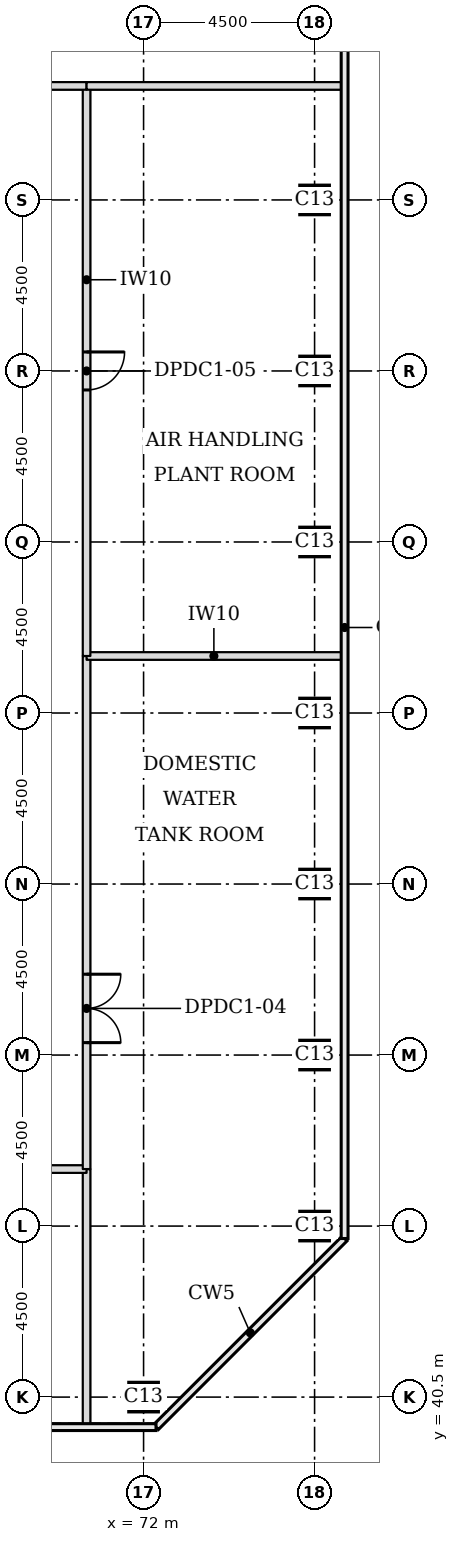
"""IFC4 building model, lengths in metres.
Left out: names, types, materials, properties, quantities, classifications, styles, units other than length and angle.
Written with IfcOpenShell. Run it as: python <this file> out.ifc"""

import sys

from ifc_helpers import new_model, si_unit, direction, frame, frame_2d, origin, origin_2d, place, context, subcontext, project, spatial, rectangle, extrude, element, fill, save


model = new_model("IFC4")
c1 = context("Model", 3, precision=1e-05, world=origin(), true_north=direction((0.0, 1.0)))
c2 = subcontext(c1, "Body", "Model", "MODEL_VIEW")
j1 = project(units=[si_unit("LENGTHUNIT", "METRE"), si_unit("PLANEANGLEUNIT", "RADIAN")], contexts=[c1])
p1 = place(None, origin())
s1 = spatial("IfcSite", under=j1, at=p1, CompositionType="ELEMENT")
p2 = place(p1, origin())
s2 = spatial("IfcBuilding", under=s1, at=p2, CompositionType="ELEMENT")
p3 = place(p2, frame((0.0, 0.0, 263.7)))
s3 = spatial("IfcBuildingStorey", under=s2, at=p3, CompositionType="ELEMENT", Elevation=263.7)
for number, where, z_axis, x_axis in (
    (1, (72.0, 40.5, 0.0), (0.0, 0.0, 1.0), (1.0, 0.0, 0.0)),
    (2, (76.5, 45.0, 0.0), (0.0, 0.0, 1.0), (1.0, 0.0, 0.0)),
    (3, (76.5, 49.5, 0.0), (0.0, 0.0, 1.0), (1.0, 0.0, 0.0)),
    (4, (76.5, 54.0, 0.0), (0.0, 0.0, 1.0), (1.0, 0.0, 0.0)),
    (5, (76.5, 58.5, 0.0), (0.0, 0.0, 1.0), (1.0, 0.0, 0.0)),
    (6, (76.5, 63.0, 0.0), (0.0, 0.0, 1.0), (1.0, 0.0, 0.0)),
    (7, (76.5, 67.5, 0.0), (0.0, 0.0, 1.0), (1.0, 0.0, 0.0)),
    (8, (76.5, 72.0, 0.0), (0.0, 0.0, 1.0), (1.0, 0.0, 0.0)),
):
    element("IfcColumn", number, at=place(p3, frame(where, z_axis=z_axis, x_axis=x_axis)), inside=s3, PredefinedType="COLUMN", context=c2, shape_type="SweptSolid", body=[
        extrude(rectangle(XDim=0.7, YDim=0.7, at=origin_2d()), origin(), (0.0, 0.0, 1.0), 5.0),
    ])
p4 = place(p3, frame((70.5, 39.8, 0.0), z_axis=(0.0, 0.0, 1.0), x_axis=(0.0, 1.0, 0.0)))
e9 = element("IfcWall", 9, at=p4, inside=s3, PredefinedType="PARTITIONING", context=c2, shape_type="SweptSolid", body=[
    extrude(rectangle(XDim=6.7, YDim=0.2, at=frame_2d((3.35, 0.0))), origin(), (0.0, 0.0, 1.0), 4.75),
])
p5 = place(p3, frame((56.0, 46.5, 0.0), z_axis=(0.0, 0.0, 1.0), x_axis=(1.0, 0.0, 0.0)))
e10 = element("IfcWall", 10, at=p5, inside=s3, PredefinedType="PARTITIONING", context=c2, shape_type="SweptSolid", body=[
    extrude(rectangle(XDim=14.5, YDim=0.2, at=frame_2d((7.25, 0.0))), origin(), (0.0, 0.0, 1.0), 4.75),
])
p6 = place(p5, frame((6.75, 0.0, 0.0)))
e11 = element("IfcOpeningElement", 11, at=p6, cuts=e10, PredefinedType="OPENING", context=c2, shape_type="SweptSolid", body=[
    extrude(rectangle(XDim=1.0, YDim=2.1, at=frame_2d((0.5, 1.05))), frame((0.0, 0.11, 0.0), z_axis=(0.0, -1.0, 0.0), x_axis=(1.0, 0.0, 0.0)), (0.0, 0.0, 1.0), 0.22),
])
p7 = place(p3, frame((70.5, 46.5, 0.0), z_axis=(0.0, 0.0, 1.0), x_axis=(0.0, 1.0, 0.0)))
e12 = element("IfcWall", 12, at=p7, inside=s3, PredefinedType="PARTITIONING", context=c2, shape_type="SweptSolid", body=[
    extrude(rectangle(XDim=13.5, YDim=0.2, at=frame_2d((6.75, 0.0))), origin(), (0.0, 0.0, 1.0), 4.75),
])
p8 = place(p7, frame((3.327, 0.0, 0.0)))
e13 = element("IfcOpeningElement", 13, at=p8, cuts=e12, PredefinedType="OPENING", context=c2, shape_type="SweptSolid", body=[
    extrude(rectangle(XDim=1.8, YDim=2.1, at=frame_2d((0.9, 1.05))), frame((0.0, 0.11, 0.0), z_axis=(0.0, -1.0, 0.0), x_axis=(1.0, 0.0, 0.0)), (0.0, 0.0, 1.0), 0.22),
])
p9 = place(p3, frame((70.5, 60.0, 0.0), z_axis=(0.0, 0.0, 1.0), x_axis=(1.0, 0.0, 0.0)))
e14 = element("IfcWall", 14, at=p9, inside=s3, PredefinedType="PARTITIONING", context=c2, shape_type="SweptSolid", body=[
    extrude(rectangle(XDim=6.7, YDim=0.2, at=frame_2d((3.35, 0.0))), origin(), (0.0, 0.0, 1.0), 4.75),
])
p10 = place(p3, frame((70.5, 60.0, 0.0), z_axis=(0.0, 0.0, 1.0), x_axis=(0.0, 1.0, 0.0)))
e15 = element("IfcWall", 15, at=p10, inside=s3, PredefinedType="PARTITIONING", context=c2, shape_type="SweptSolid", body=[
    extrude(rectangle(XDim=15.0, YDim=0.2, at=frame_2d((7.5, 0.0))), origin(), (0.0, 0.0, 1.0), 4.75),
])
p11 = place(p10, frame((7.0, 0.0, 0.0)))
e16 = element("IfcOpeningElement", 16, at=p11, cuts=e15, PredefinedType="OPENING", context=c2, shape_type="SweptSolid", body=[
    extrude(rectangle(XDim=1.0, YDim=2.1, at=frame_2d((0.5, 1.05))), frame((0.0, 0.11, 0.0), z_axis=(0.0, -1.0, 0.0), x_axis=(1.0, 0.0, 0.0)), (0.0, 0.0, 1.0), 0.22),
])
p12 = place(p3, frame((56.0, 75.0, 0.0), z_axis=(0.0, 0.0, 1.0), x_axis=(1.0, 0.0, 0.0)))
e17 = element("IfcWall", 17, at=p12, inside=s3, PredefinedType="PARTITIONING", context=c2, shape_type="SweptSolid", body=[
    extrude(rectangle(XDim=14.5, YDim=0.2, at=frame_2d((7.25, 0.0))), origin(), (0.0, 0.0, 1.0), 4.75),
])
p13 = place(p12, frame((8.869, 0.0, 0.0)))
e18 = element("IfcOpeningElement", 18, at=p13, cuts=e17, PredefinedType="OPENING", context=c2, shape_type="SweptSolid", body=[
    extrude(rectangle(XDim=1.8, YDim=2.1, at=frame_2d((0.9, 1.05))), frame((0.0, 0.11, 0.0), z_axis=(0.0, -1.0, 0.0), x_axis=(1.0, 0.0, 0.0)), (0.0, 0.0, 1.0), 0.22),
])
p14 = place(p3, frame((70.5, 75.0, 0.0), z_axis=(0.0, 0.0, 1.0), x_axis=(1.0, 0.0, 0.0)))
e19 = element("IfcWall", 19, at=p14, inside=s3, PredefinedType="PARTITIONING", context=c2, shape_type="SweptSolid", body=[
    extrude(rectangle(XDim=6.7, YDim=0.2, at=frame_2d((3.35, 0.0))), origin(), (0.0, 0.0, 1.0), 4.75),
])
p15 = place(p8, frame((1.8, 0.0, 0.0), z_axis=(0.0, 0.0, 1.0), x_axis=(-1.0, 0.0, 0.0)))
e20 = element("IfcDoor", 20, at=p15, inside=s3, OperationType="DOUBLE_DOOR_SINGLE_SWING", PredefinedType="DOOR", context=c2, shape_type="SweptSolid", body=[
    extrude(rectangle(XDim=1.8, YDim=2.1, at=frame_2d((0.9, 1.05))), frame((0.0, 0.025, 0.0), z_axis=(0.0, -1.0, 0.0), x_axis=(1.0, 0.0, 0.0)), (0.0, 0.0, 1.0), 0.05),
])
fill(e13, e20)
p16 = place(p11, frame((1.0, 0.0, 0.0), z_axis=(0.0, 0.0, 1.0), x_axis=(-1.0, 0.0, 0.0)))
e21 = element("IfcDoor", 21, at=p16, inside=s3, OperationType="SINGLE_SWING_LEFT", PredefinedType="DOOR", context=c2, shape_type="SweptSolid", body=[
    extrude(rectangle(XDim=1.0, YDim=2.1, at=frame_2d((0.5, 1.05))), frame((0.0, 0.025, 0.0), z_axis=(0.0, -1.0, 0.0), x_axis=(1.0, 0.0, 0.0)), (0.0, 0.0, 1.0), 0.05),
])
fill(e16, e21)
save(model, sys.argv[1])
